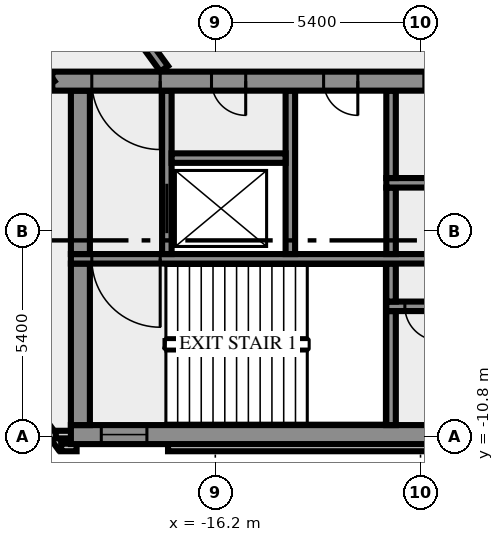
"""IFC4 building model, lengths in metres.
Left out: names, types, materials, properties, quantities, classifications, styles, units other than length and angle.
Written with IfcOpenShell. Run it as: python <this file> out.ifc"""

import sys

from ifc_helpers import new_model, si_unit, direction, frame, frame_2d, origin, place, context, subcontext, project, spatial, rectangle, extrude, element, fill, save


model = new_model("IFC4")
c1 = context("Model", 3, precision=1e-05, world=origin(), true_north=direction((0.0, 1.0)))
c2 = subcontext(c1, "Body", "Model", "MODEL_VIEW")
j1 = project(units=[si_unit("LENGTHUNIT", "METRE"), si_unit("PLANEANGLEUNIT", "RADIAN")], contexts=[c1])
p1 = place(None, origin())
s1 = spatial("IfcSite", under=j1, at=p1, CompositionType="ELEMENT")
p2 = place(p1, origin())
s2 = spatial("IfcBuilding", under=s1, at=p2, CompositionType="ELEMENT")
p3 = place(p2, frame((0.0, 0.0, 202.0)))
s3 = spatial("IfcBuildingStorey", under=s2, at=p3, CompositionType="ELEMENT", Elevation=202.0)
p4 = place(p3, frame((-21.833, -8.909, 0.0), z_axis=(0.0, 0.0, 1.0), x_axis=(0.587766567315, -0.809030569476, 0.0)))
e1 = element("IfcWall", 1, at=p4, inside=s3, PredefinedType="SOLIDWALL", context=c2, shape_type="SweptSolid", body=[
    extrude(rectangle(XDim=2.688, YDim=0.2, at=frame_2d((1.344, 0.0))), origin(), (0.0, 0.0, 1.0), 3.65),
])
p5 = place(p3, frame((-20.256, -11.088, 0.0), z_axis=(0.0, 0.0, 1.0), x_axis=(1.0, 0.0, 0.0)))
e2 = element("IfcWall", 2, at=p5, inside=s3, PredefinedType="SOLIDWALL", context=c2, shape_type="SweptSolid", body=[
    extrude(rectangle(XDim=0.406, YDim=0.2, at=frame_2d((0.203, 0.0))), origin(), (0.0, 0.0, 1.0), 3.65),
])
p6 = place(p3, frame((-17.444, -11.088, 0.0), z_axis=(0.0, 0.0, 1.0), x_axis=(1.0, 0.0, 0.0)))
e3 = element("IfcWall", 3, at=p6, inside=s3, PredefinedType="SOLIDWALL", context=c2, shape_type="SweptSolid", body=[
    extrude(rectangle(XDim=34.888, YDim=0.2, at=frame_2d((17.444, 0.0))), origin(), (0.0, 0.0, 1.0), 3.65),
])
p7 = place(p3, frame((-19.98, -10.75, 0.0), z_axis=(0.0, 0.0, 1.0), x_axis=(-1.0, 0.0, 0.0)))
e4 = element("IfcWall", 4, at=p7, inside=s3, PredefinedType="SOLIDWALL", context=c2, shape_type="SweptSolid", body=[
    extrude(rectangle(XDim=0.417, YDim=0.2, at=frame_2d((0.208, 0.0))), origin(), (0.0, 0.0, 1.0), 3.65),
])
p8 = place(p3, frame((-20.0, -10.75, 0.0), z_axis=(0.0, 0.0, 1.0), x_axis=(1.0, 0.0, 0.0)))
e5 = element("IfcWall", 5, at=p8, inside=s3, PredefinedType="SHEAR", context=c2, shape_type="SweptSolid", body=[
    extrude(rectangle(XDim=40.0, YDim=0.5, at=frame_2d((20.0, 0.0))), origin(), (0.0, 0.0, 1.0), 3.65),
])
p9 = place(p8, frame((0.8, 0.0, 1.0)))
e6 = element("IfcOpeningElement", 6, at=p9, cuts=e5, PredefinedType="OPENING", context=c2, shape_type="SweptSolid", body=[
    extrude(rectangle(XDim=1.2, YDim=1.2, at=frame_2d((0.6, 0.6))), frame((0.0, 0.26, 0.0), z_axis=(0.0, -1.0, 0.0), x_axis=(1.0, 0.0, 0.0)), (0.0, 0.0, 1.0), 0.52),
])
p10 = place(p8, frame((38.0, 0.0, 1.0)))
e7 = element("IfcOpeningElement", 7, at=p10, cuts=e5, PredefinedType="OPENING", context=c2, shape_type="SweptSolid", body=[
    extrude(rectangle(XDim=1.2, YDim=1.2, at=frame_2d((0.6, 0.6))), frame((0.0, 0.26, 0.0), z_axis=(0.0, -1.0, 0.0), x_axis=(1.0, 0.0, 0.0)), (0.0, 0.0, 1.0), 0.52),
])
p11 = place(p3, frame((-19.75, -10.5, 0.0), z_axis=(0.0, 0.0, 1.0), x_axis=(0.0, 1.0, 0.0)))
e8 = element("IfcWall", 8, at=p11, inside=s3, PredefinedType="SHEAR", context=c2, shape_type="SweptSolid", body=[
    extrude(rectangle(XDim=4.25, YDim=0.5, at=frame_2d((2.125, 0.0))), origin(), (0.0, 0.0, 1.0), 3.65),
])
p12 = place(p3, frame((-11.575, -10.5, 0.0), z_axis=(0.0, 0.0, 1.0), x_axis=(0.0, 1.0, 0.0)))
e9 = element("IfcWall", 9, at=p12, inside=s3, PredefinedType="SHEAR", context=c2, shape_type="SweptSolid", body=[
    extrude(rectangle(XDim=3.0, YDim=0.25, at=frame_2d((1.5, 0.0))), origin(), (0.0, 0.0, 1.0), 3.65),
])
p13 = place(p3, frame((11.7, -7.375, 0.0), z_axis=(0.0, 0.0, 1.0), x_axis=(-1.0, 0.0, 0.0)))
e10 = element("IfcWall", 10, at=p13, inside=s3, PredefinedType="SHEAR", context=c2, shape_type="SweptSolid", body=[
    extrude(rectangle(XDim=23.4, YDim=0.25, at=frame_2d((11.7, 0.0))), origin(), (0.0, 0.0, 1.0), 3.65),
])
p14 = place(p13, frame((22.012, 0.0, 0.0)))
e11 = element("IfcOpeningElement", 11, at=p14, cuts=e10, PredefinedType="OPENING", context=c2, shape_type="SweptSolid", body=[
    extrude(rectangle(XDim=0.9, YDim=2.1, at=frame_2d((0.45, 1.05))), frame((0.0, 0.135, 0.0), z_axis=(0.0, -1.0, 0.0), x_axis=(1.0, 0.0, 0.0)), (0.0, 0.0, 1.0), 0.27),
])
p15 = place(p13, frame((20.25, 0.0, 0.0)))
e12 = element("IfcOpeningElement", 12, at=p15, cuts=e10, PredefinedType="OPENING", context=c2, shape_type="SweptSolid", body=[
    extrude(rectangle(XDim=0.9, YDim=2.1, at=frame_2d((0.45, 1.05))), frame((0.0, 0.135, 0.0), z_axis=(0.0, -1.0, 0.0), x_axis=(1.0, 0.0, 0.0)), (0.0, 0.0, 1.0), 0.27),
])
p16 = place(p13, frame((18.25, 0.0, 0.0)))
e13 = element("IfcOpeningElement", 13, at=p16, cuts=e10, PredefinedType="OPENING", context=c2, shape_type="SweptSolid", body=[
    extrude(rectangle(XDim=0.9, YDim=2.1, at=frame_2d((0.45, 1.05))), frame((0.0, 0.135, 0.0), z_axis=(0.0, -1.0, 0.0), x_axis=(1.0, 0.0, 0.0)), (0.0, 0.0, 1.0), 0.27),
])
p17 = place(p13, frame((16.287, 0.0, 0.0)))
e14 = element("IfcOpeningElement", 14, at=p17, cuts=e10, PredefinedType="OPENING", context=c2, shape_type="SweptSolid", body=[
    extrude(rectangle(XDim=0.9, YDim=2.1, at=frame_2d((0.45, 1.05))), frame((0.0, 0.135, 0.0), z_axis=(0.0, -1.0, 0.0), x_axis=(1.0, 0.0, 0.0)), (0.0, 0.0, 1.0), 0.27),
])
p18 = place(p13, frame((14.25, 0.0, 0.0)))
e15 = element("IfcOpeningElement", 15, at=p18, cuts=e10, PredefinedType="OPENING", context=c2, shape_type="SweptSolid", body=[
    extrude(rectangle(XDim=0.9, YDim=2.1, at=frame_2d((0.45, 1.05))), frame((0.0, 0.135, 0.0), z_axis=(0.0, -1.0, 0.0), x_axis=(1.0, 0.0, 0.0)), (0.0, 0.0, 1.0), 0.27),
])
p19 = place(p13, frame((12.125, 0.0, 0.0)))
e16 = element("IfcOpeningElement", 16, at=p19, cuts=e10, PredefinedType="OPENING", context=c2, shape_type="SweptSolid", body=[
    extrude(rectangle(XDim=0.9, YDim=2.1, at=frame_2d((0.45, 1.05))), frame((0.0, 0.135, 0.0), z_axis=(0.0, -1.0, 0.0), x_axis=(1.0, 0.0, 0.0)), (0.0, 0.0, 1.0), 0.27),
])
p20 = place(p13, frame((10.45, 0.0, 0.0)))
e17 = element("IfcOpeningElement", 17, at=p20, cuts=e10, PredefinedType="OPENING", context=c2, shape_type="SweptSolid", body=[
    extrude(rectangle(XDim=0.75, YDim=2.1, at=frame_2d((0.375, 1.05))), frame((0.0, 0.135, 0.0), z_axis=(0.0, -1.0, 0.0), x_axis=(1.0, 0.0, 0.0)), (0.0, 0.0, 1.0), 0.27),
])
p21 = place(p13, frame((8.35, 0.0, 0.0)))
e18 = element("IfcOpeningElement", 18, at=p21, cuts=e10, PredefinedType="OPENING", context=c2, shape_type="SweptSolid", body=[
    extrude(rectangle(XDim=1.1, YDim=2.1, at=frame_2d((0.55, 1.05))), frame((0.0, 0.135, 0.0), z_axis=(0.0, -1.0, 0.0), x_axis=(1.0, 0.0, 0.0)), (0.0, 0.0, 1.0), 0.27),
])
p22 = place(p13, frame((5.85, 0.0, 0.0)))
e19 = element("IfcOpeningElement", 19, at=p22, cuts=e10, PredefinedType="OPENING", context=c2, shape_type="SweptSolid", body=[
    extrude(rectangle(XDim=1.1, YDim=2.1, at=frame_2d((0.55, 1.05))), frame((0.0, 0.135, 0.0), z_axis=(0.0, -1.0, 0.0), x_axis=(1.0, 0.0, 0.0)), (0.0, 0.0, 1.0), 0.27),
])
p23 = place(p13, frame((3.35, 0.0, 0.0)))
e20 = element("IfcOpeningElement", 20, at=p23, cuts=e10, PredefinedType="OPENING", context=c2, shape_type="SweptSolid", body=[
    extrude(rectangle(XDim=1.1, YDim=2.1, at=frame_2d((0.55, 1.05))), frame((0.0, 0.135, 0.0), z_axis=(0.0, -1.0, 0.0), x_axis=(1.0, 0.0, 0.0)), (0.0, 0.0, 1.0), 0.27),
])
p24 = place(p13, frame((0.85, 0.0, 0.0)))
e21 = element("IfcOpeningElement", 21, at=p24, cuts=e10, PredefinedType="OPENING", context=c2, shape_type="SweptSolid", body=[
    extrude(rectangle(XDim=1.1, YDim=2.1, at=frame_2d((0.55, 1.05))), frame((0.0, 0.135, 0.0), z_axis=(0.0, -1.0, 0.0), x_axis=(1.0, 0.0, 0.0)), (0.0, 0.0, 1.0), 0.27),
])
p25 = place(p3, frame((-11.575, -7.25, 0.0), z_axis=(0.0, 0.0, 1.0), x_axis=(0.0, 1.0, 0.0)))
e22 = element("IfcWall", 22, at=p25, inside=s3, PredefinedType="SHEAR", context=c2, shape_type="SweptSolid", body=[
    extrude(rectangle(XDim=1.0, YDim=0.25, at=frame_2d((0.5, 0.0))), origin(), (0.0, 0.0, 1.0), 3.65),
])
p26 = place(p3, frame((-9.2, -6.125, 0.0), z_axis=(0.0, 0.0, 1.0), x_axis=(-1.0, 0.0, 0.0)))
e23 = element("IfcWall", 23, at=p26, inside=s3, PredefinedType="SHEAR", context=c2, shape_type="SweptSolid", body=[
    extrude(rectangle(XDim=10.8, YDim=0.25, at=frame_2d((5.4, 0.0))), origin(), (0.0, 0.0, 1.0), 3.65),
])
p27 = place(p26, frame((8.45, 0.0, 0.0)))
e24 = element("IfcOpeningElement", 24, at=p27, cuts=e23, PredefinedType="OPENING", context=c2, shape_type="SweptSolid", body=[
    extrude(rectangle(XDim=1.8, YDim=2.1, at=frame_2d((0.9, 1.05))), frame((0.0, 0.135, 0.0), z_axis=(0.0, -1.0, 0.0), x_axis=(1.0, 0.0, 0.0)), (0.0, 0.0, 1.0), 0.27),
])
p28 = place(p3, frame((-19.75, -6.0, 0.0), z_axis=(0.0, 0.0, 1.0), x_axis=(0.0, 1.0, 0.0)))
e25 = element("IfcWall", 25, at=p28, inside=s3, PredefinedType="SHEAR", context=c2, shape_type="SweptSolid", body=[
    extrude(rectangle(XDim=4.3, YDim=0.5, at=frame_2d((2.15, 0.0))), origin(), (0.0, 0.0, 1.0), 3.65),
])
p29 = place(p3, frame((-17.475, -6.0, 0.0), z_axis=(0.0, 0.0, 1.0), x_axis=(0.0, 1.0, 0.0)))
e26 = element("IfcWall", 26, at=p29, inside=s3, PredefinedType="SHEAR", context=c2, shape_type="SweptSolid", body=[
    extrude(rectangle(XDim=4.3, YDim=0.25, at=frame_2d((2.15, 0.0))), origin(), (0.0, 0.0, 1.0), 3.65),
])
p30 = place(p29, frame((0.55, 0.0, 0.0)))
e27 = element("IfcOpeningElement", 27, at=p30, cuts=e26, PredefinedType="OPENING", context=c2, shape_type="SweptSolid", body=[
    extrude(rectangle(XDim=1.3, YDim=2.1, at=frame_2d((0.65, 1.05))), frame((0.0, 0.135, 0.0), z_axis=(0.0, -1.0, 0.0), x_axis=(1.0, 0.0, 0.0)), (0.0, 0.0, 1.0), 0.27),
])
p31 = place(p3, frame((-14.225, -6.0, 0.0), z_axis=(0.0, 0.0, 1.0), x_axis=(0.0, 1.0, 0.0)))
e28 = element("IfcWall", 28, at=p31, inside=s3, PredefinedType="SHEAR", context=c2, shape_type="SweptSolid", body=[
    extrude(rectangle(XDim=4.3, YDim=0.25, at=frame_2d((2.15, 0.0))), origin(), (0.0, 0.0, 1.0), 3.65),
])
p32 = place(p3, frame((-11.575, -6.0, 0.0), z_axis=(0.0, 0.0, 1.0), x_axis=(0.0, 1.0, 0.0)))
e29 = element("IfcWall", 29, at=p32, inside=s3, PredefinedType="SHEAR", context=c2, shape_type="SweptSolid", body=[
    extrude(rectangle(XDim=1.75, YDim=0.25, at=frame_2d((0.875, 0.0))), origin(), (0.0, 0.0, 1.0), 3.65),
])
p33 = place(p3, frame((-11.7, -4.125, 0.0), z_axis=(0.0, 0.0, 1.0), x_axis=(1.0, 0.0, 0.0)))
e30 = element("IfcWall", 30, at=p33, inside=s3, PredefinedType="SHEAR", context=c2, shape_type="SweptSolid", body=[
    extrude(rectangle(XDim=10.05, YDim=0.25, at=frame_2d((5.025, 0.0))), origin(), (0.0, 0.0, 1.0), 3.65),
])
p34 = place(p3, frame((-11.575, -4.0, 0.0), z_axis=(0.0, 0.0, 1.0), x_axis=(0.0, 1.0, 0.0)))
e31 = element("IfcWall", 31, at=p34, inside=s3, PredefinedType="SHEAR", context=c2, shape_type="SweptSolid", body=[
    extrude(rectangle(XDim=2.3, YDim=0.25, at=frame_2d((1.15, 0.0))), origin(), (0.0, 0.0, 1.0), 3.65),
])
p35 = place(p3, frame((-17.35, -3.475, 0.0), z_axis=(0.0, 0.0, 1.0), x_axis=(1.0, 0.0, 0.0)))
e32 = element("IfcWall", 32, at=p35, inside=s3, PredefinedType="SHEAR", context=c2, shape_type="SweptSolid", body=[
    extrude(rectangle(XDim=3.0, YDim=0.25, at=frame_2d((1.5, 0.0))), origin(), (0.0, 0.0, 1.0), 3.65),
])
p36 = place(p3, frame((20.49, -1.45, 0.0), z_axis=(0.0, 0.0, 1.0), x_axis=(-1.0, 0.0, 0.0)))
e33 = element("IfcWall", 33, at=p36, inside=s3, PredefinedType="SHEAR", context=c2, shape_type="SweptSolid", body=[
    extrude(rectangle(XDim=40.98, YDim=0.5, at=frame_2d((20.49, 0.0))), origin(), (0.0, 0.0, 1.0), 3.65),
])
p37 = place(p36, frame((38.14, 0.0, 0.0)))
e34 = element("IfcOpeningElement", 34, at=p37, cuts=e33, PredefinedType="OPENING", context=c2, shape_type="SweptSolid", body=[
    extrude(rectangle(XDim=1.8, YDim=2.1, at=frame_2d((0.9, 1.05))), frame((0.0, 0.26, 0.0), z_axis=(0.0, -1.0, 0.0), x_axis=(1.0, 0.0, 0.0)), (0.0, 0.0, 1.0), 0.52),
])
p38 = place(p36, frame((35.89, 0.0, 0.0)))
e35 = element("IfcOpeningElement", 35, at=p38, cuts=e33, PredefinedType="OPENING", context=c2, shape_type="SweptSolid", body=[
    extrude(rectangle(XDim=0.9, YDim=2.1, at=frame_2d((0.45, 1.05))), frame((0.0, 0.26, 0.0), z_axis=(0.0, -1.0, 0.0), x_axis=(1.0, 0.0, 0.0)), (0.0, 0.0, 1.0), 0.52),
])
p39 = place(p36, frame((32.94, 0.0, 0.0)))
e36 = element("IfcOpeningElement", 36, at=p39, cuts=e33, PredefinedType="OPENING", context=c2, shape_type="SweptSolid", body=[
    extrude(rectangle(XDim=0.9, YDim=2.1, at=frame_2d((0.45, 1.05))), frame((0.0, 0.26, 0.0), z_axis=(0.0, -1.0, 0.0), x_axis=(1.0, 0.0, 0.0)), (0.0, 0.0, 1.0), 0.52),
])
p40 = place(p36, frame((30.302, 0.0, 0.0)))
e37 = element("IfcOpeningElement", 37, at=p40, cuts=e33, PredefinedType="OPENING", context=c2, shape_type="SweptSolid", body=[
    extrude(rectangle(XDim=0.9, YDim=2.1, at=frame_2d((0.45, 1.05))), frame((0.0, 0.26, 0.0), z_axis=(0.0, -1.0, 0.0), x_axis=(1.0, 0.0, 0.0)), (0.0, 0.0, 1.0), 0.52),
])
p41 = place(p36, frame((26.577, 0.0, 0.0)))
e38 = element("IfcOpeningElement", 38, at=p41, cuts=e33, PredefinedType="OPENING", context=c2, shape_type="SweptSolid", body=[
    extrude(rectangle(XDim=0.9, YDim=2.1, at=frame_2d((0.45, 1.05))), frame((0.0, 0.26, 0.0), z_axis=(0.0, -1.0, 0.0), x_axis=(1.0, 0.0, 0.0)), (0.0, 0.0, 1.0), 0.52),
])
p42 = place(p36, frame((19.59, 0.0, 0.0)))
e39 = element("IfcOpeningElement", 39, at=p42, cuts=e33, PredefinedType="OPENING", context=c2, shape_type="SweptSolid", body=[
    extrude(rectangle(XDim=2.0, YDim=2.1, at=frame_2d((1.0, 1.05))), frame((0.0, 0.26, 0.0), z_axis=(0.0, -1.0, 0.0), x_axis=(1.0, 0.0, 0.0)), (0.0, 0.0, 1.0), 0.52),
])
p43 = place(p36, frame((7.14, 0.0, 0.0)))
e40 = element("IfcOpeningElement", 40, at=p43, cuts=e33, PredefinedType="OPENING", context=c2, shape_type="SweptSolid", body=[
    extrude(rectangle(XDim=0.9, YDim=2.1, at=frame_2d((0.45, 1.05))), frame((0.0, 0.26, 0.0), z_axis=(0.0, -1.0, 0.0), x_axis=(1.0, 0.0, 0.0)), (0.0, 0.0, 1.0), 0.52),
])
p44 = place(p36, frame((5.028, 0.0, 0.0)))
e41 = element("IfcOpeningElement", 41, at=p44, cuts=e33, PredefinedType="OPENING", context=c2, shape_type="SweptSolid", body=[
    extrude(rectangle(XDim=0.8, YDim=2.1, at=frame_2d((0.4, 1.05))), frame((0.0, 0.26, 0.0), z_axis=(0.0, -1.0, 0.0), x_axis=(1.0, 0.0, 0.0)), (0.0, 0.0, 1.0), 0.52),
])
p45 = place(p36, frame((3.452, 0.0, 0.0)))
e42 = element("IfcOpeningElement", 42, at=p45, cuts=e33, PredefinedType="OPENING", context=c2, shape_type="SweptSolid", body=[
    extrude(rectangle(XDim=0.8, YDim=2.1, at=frame_2d((0.4, 1.05))), frame((0.0, 0.26, 0.0), z_axis=(0.0, -1.0, 0.0), x_axis=(1.0, 0.0, 0.0)), (0.0, 0.0, 1.0), 0.52),
])
p46 = place(p36, frame((1.04, 0.0, 0.0)))
e43 = element("IfcOpeningElement", 43, at=p46, cuts=e33, PredefinedType="OPENING", context=c2, shape_type="SweptSolid", body=[
    extrude(rectangle(XDim=1.8, YDim=2.1, at=frame_2d((0.9, 1.05))), frame((0.0, 0.26, 0.0), z_axis=(0.0, -1.0, 0.0), x_axis=(1.0, 0.0, 0.0)), (0.0, 0.0, 1.0), 0.52),
])
p47 = place(p3, frame((-20.531, -1.523, 0.0), z_axis=(0.0, 0.0, 1.0), x_axis=(-0.587785812891, 0.809016587076, 0.0)))
e44 = element("IfcWall", 44, at=p47, inside=s3, PredefinedType="SOLIDWALL", context=c2, shape_type="SweptSolid", body=[
    extrude(rectangle(XDim=28.67, YDim=0.25, at=frame_2d((14.335, 0.0))), origin(), (0.0, 0.0, 1.0), 3.65),
])
p48 = place(p47, frame((17.015, 0.0, 0.0)))
e45 = element("IfcOpeningElement", 45, at=p48, cuts=e44, PredefinedType="OPENING", context=c2, shape_type="SweptSolid", body=[
    extrude(rectangle(XDim=0.9, YDim=2.1, at=frame_2d((0.45, 1.05))), frame((0.0, 0.135, 0.0), z_axis=(0.0, -1.0, 0.0), x_axis=(1.0, 0.0, 0.0)), (0.0, 0.0, 1.0), 0.27),
])
p49 = place(p47, frame((8.916, 0.0, 0.0)))
e46 = element("IfcOpeningElement", 46, at=p49, cuts=e44, PredefinedType="OPENING", context=c2, shape_type="SweptSolid", body=[
    extrude(rectangle(XDim=0.9, YDim=2.1, at=frame_2d((0.45, 1.05))), frame((0.0, 0.135, 0.0), z_axis=(0.0, -1.0, 0.0), x_axis=(1.0, 0.0, 0.0)), (0.0, 0.0, 1.0), 0.27),
])
p50 = place(p47, frame((18.616, 0.0, 0.0)))
e47 = element("IfcOpeningElement", 47, at=p50, cuts=e44, PredefinedType="OPENING", context=c2, shape_type="SweptSolid", body=[
    extrude(rectangle(XDim=0.9, YDim=2.1, at=frame_2d((0.45, 1.05))), frame((0.0, 0.135, 0.0), z_axis=(0.0, -1.0, 0.0), x_axis=(1.0, 0.0, 0.0)), (0.0, 0.0, 1.0), 0.27),
])
p51 = place(p47, frame((11.615, 0.0, 0.0)))
e48 = element("IfcOpeningElement", 48, at=p51, cuts=e44, PredefinedType="OPENING", context=c2, shape_type="SweptSolid", body=[
    extrude(rectangle(XDim=0.9, YDim=2.1, at=frame_2d((0.45, 1.05))), frame((0.0, 0.135, 0.0), z_axis=(0.0, -1.0, 0.0), x_axis=(1.0, 0.0, 0.0)), (0.0, 0.0, 1.0), 0.27),
])
p52 = place(p3, frame((-35.092, 23.027, 0.0), z_axis=(0.0, 0.0, 1.0), x_axis=(0.587784076945, -0.809017848313, 0.0)))
e49 = element("IfcWall", 49, at=p52, inside=s3, PredefinedType="SOLIDWALL", context=c2, shape_type="SweptSolid", body=[
    extrude(rectangle(XDim=29.853, YDim=0.25, at=frame_2d((14.927, 0.0))), origin(), (0.0, 0.0, 1.0), 3.65),
])
p53 = place(p52, frame((10.095, 0.0, 0.0)))
e50 = element("IfcOpeningElement", 50, at=p53, cuts=e49, PredefinedType="OPENING", context=c2, shape_type="SweptSolid", body=[
    extrude(rectangle(XDim=0.9, YDim=2.1, at=frame_2d((0.45, 1.05))), frame((0.0, 0.135, 0.0), z_axis=(0.0, -1.0, 0.0), x_axis=(1.0, 0.0, 0.0)), (0.0, 0.0, 1.0), 0.27),
])
p54 = place(p52, frame((15.495, 0.0, 0.0)))
e51 = element("IfcOpeningElement", 51, at=p54, cuts=e49, PredefinedType="OPENING", context=c2, shape_type="SweptSolid", body=[
    extrude(rectangle(XDim=0.9, YDim=2.1, at=frame_2d((0.45, 1.05))), frame((0.0, 0.135, 0.0), z_axis=(0.0, -1.0, 0.0), x_axis=(1.0, 0.0, 0.0)), (0.0, 0.0, 1.0), 0.27),
])
p55 = place(p52, frame((0.224, 0.0, 0.0)))
e52 = element("IfcOpeningElement", 52, at=p55, cuts=e49, PredefinedType="OPENING", context=c2, shape_type="SweptSolid", body=[
    extrude(rectangle(XDim=0.9, YDim=2.1, at=frame_2d((0.45, 1.05))), frame((0.0, 0.135, 0.0), z_axis=(0.0, -1.0, 0.0), x_axis=(1.0, 0.0, 0.0)), (0.0, 0.0, 1.0), 0.27),
])
p56 = place(p9, origin())
e53 = element("IfcWindow", 53, at=p56, inside=s3, PartitioningType="SINGLE_PANEL", PredefinedType="WINDOW", context=c2, shape_type="SweptSolid", body=[
    extrude(rectangle(XDim=1.2, YDim=1.2, at=frame_2d((0.6, 0.6))), frame((0.0, 0.03, 0.0), z_axis=(0.0, -1.0, 0.0), x_axis=(1.0, 0.0, 0.0)), (0.0, 0.0, 1.0), 0.06),
])
fill(e6, e53)
p57 = place(p14, origin())
e54 = element("IfcDoor", 54, at=p57, inside=s3, OperationType="SINGLE_SWING_RIGHT", PredefinedType="DOOR", context=c2, shape_type="SweptSolid", body=[
    extrude(rectangle(XDim=0.9, YDim=2.1, at=frame_2d((0.45, 1.05))), frame((0.0, 0.025, 0.0), z_axis=(0.0, -1.0, 0.0), x_axis=(1.0, 0.0, 0.0)), (0.0, 0.0, 1.0), 0.05),
])
fill(e11, e54)
p58 = place(p27, origin())
e55 = element("IfcDoor", 55, at=p58, inside=s3, OperationType="DOUBLE_DOOR_SINGLE_SWING", PredefinedType="DOOR", context=c2, shape_type="SweptSolid", body=[
    extrude(rectangle(XDim=1.8, YDim=2.1, at=frame_2d((0.9, 1.05))), frame((0.0, 0.025, 0.0), z_axis=(0.0, -1.0, 0.0), x_axis=(1.0, 0.0, 0.0)), (0.0, 0.0, 1.0), 0.05),
])
fill(e24, e55)
p59 = place(p30, origin())
e56 = element("IfcDoor", 56, at=p59, inside=s3, OperationType="DOUBLE_DOOR_SLIDING", PredefinedType="DOOR", context=c2, shape_type="SweptSolid", body=[
    extrude(rectangle(XDim=1.3, YDim=2.1, at=frame_2d((0.65, 1.05))), frame((0.0, 0.025, 0.0), z_axis=(0.0, -1.0, 0.0), x_axis=(1.0, 0.0, 0.0)), (0.0, 0.0, 1.0), 0.05),
])
fill(e27, e56)
p60 = place(p37, origin())
e57 = element("IfcDoor", 57, at=p60, inside=s3, OperationType="DOUBLE_DOOR_SINGLE_SWING", PredefinedType="DOOR", context=c2, shape_type="SweptSolid", body=[
    extrude(rectangle(XDim=1.8, YDim=2.1, at=frame_2d((0.9, 1.05))), frame((0.0, 0.025, 0.0), z_axis=(0.0, -1.0, 0.0), x_axis=(1.0, 0.0, 0.0)), (0.0, 0.0, 1.0), 0.05),
])
fill(e34, e57)
p61 = place(p38, origin())
e58 = element("IfcDoor", 58, at=p61, inside=s3, OperationType="SINGLE_SWING_RIGHT", PredefinedType="DOOR", context=c2, shape_type="SweptSolid", body=[
    extrude(rectangle(XDim=0.9, YDim=2.1, at=frame_2d((0.45, 1.05))), frame((0.0, 0.025, 0.0), z_axis=(0.0, -1.0, 0.0), x_axis=(1.0, 0.0, 0.0)), (0.0, 0.0, 1.0), 0.05),
])
fill(e35, e58)
p62 = place(p39, origin())
e59 = element("IfcDoor", 59, at=p62, inside=s3, OperationType="SINGLE_SWING_RIGHT", PredefinedType="DOOR", context=c2, shape_type="SweptSolid", body=[
    extrude(rectangle(XDim=0.9, YDim=2.1, at=frame_2d((0.45, 1.05))), frame((0.0, 0.025, 0.0), z_axis=(0.0, -1.0, 0.0), x_axis=(1.0, 0.0, 0.0)), (0.0, 0.0, 1.0), 0.05),
])
fill(e36, e59)
p63 = place(p40, origin())
e60 = element("IfcDoor", 60, at=p63, inside=s3, OperationType="SINGLE_SWING_RIGHT", PredefinedType="DOOR", context=c2, shape_type="SweptSolid", body=[
    extrude(rectangle(XDim=0.9, YDim=2.1, at=frame_2d((0.45, 1.05))), frame((0.0, 0.025, 0.0), z_axis=(0.0, -1.0, 0.0), x_axis=(1.0, 0.0, 0.0)), (0.0, 0.0, 1.0), 0.05),
])
fill(e37, e60)
save(model, sys.argv[1])
